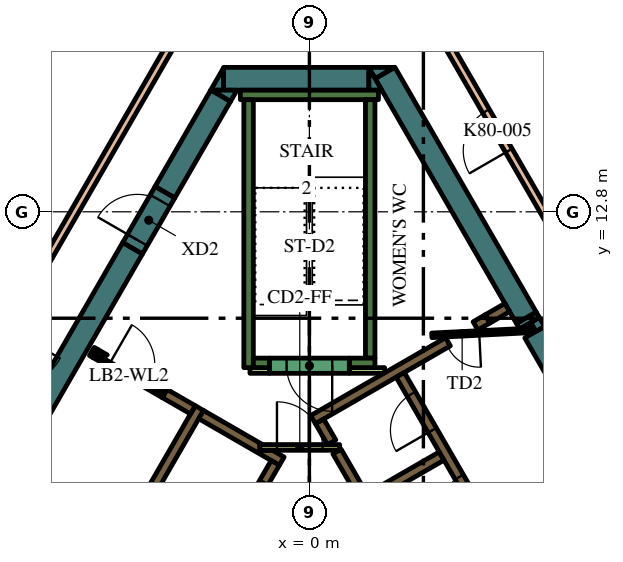
"""IFC4 building model, lengths in metres.
Left out: names, types, materials, properties, quantities, classifications, styles, units other than length and angle.
Written with IfcOpenShell. Run it as: python <this file> out.ifc"""

import sys

from ifc_helpers import new_model, si_unit, direction, frame, frame_2d, origin, origin_2d, place, context, subcontext, project, spatial, polyline, rectangle, outline, extrude, element, fill, save


model = new_model("IFC4")
c1 = context("Model", 3, precision=1e-05, world=origin(), true_north=direction((0.0, 1.0)))
c2 = subcontext(c1, "Body", "Model", "MODEL_VIEW")
j1 = project(units=[si_unit("LENGTHUNIT", "METRE"), si_unit("PLANEANGLEUNIT", "RADIAN")], contexts=[c1])
p1 = place(None, origin())
s1 = spatial("IfcSite", under=j1, at=p1, CompositionType="ELEMENT")
p2 = place(p1, origin())
s2 = spatial("IfcBuilding", under=s1, at=p2, CompositionType="ELEMENT")
p3 = place(p2, frame((0.0, 0.0, 344.4)))
s3 = spatial("IfcBuildingStorey", under=s2, at=p3, CompositionType="ELEMENT", Elevation=344.4)
p4 = place(p3, frame((5.709, 10.012, 0.0), z_axis=(0.0, 0.0, 1.0), x_axis=(0.500399834964, -0.865794435861, 0.0)))
e1 = element("IfcWall", 1, at=p4, inside=s3, PredefinedType="SOLIDWALL", context=c2, shape_type="SweptSolid", body=[
    extrude(rectangle(XDim=0.166, YDim=0.6, at=frame_2d((0.083, 0.0))), origin(), (0.0, 0.0, 1.0), 4.2),
])
p5 = place(p3, frame((5.928, 9.633, 0.0), z_axis=(0.0, 0.0, 1.0), x_axis=(0.499983823482, -0.8660347431, 0.0)))
e2 = element("IfcWall", 2, at=p5, inside=s3, PredefinedType="SOLIDWALL", context=c2, shape_type="SweptSolid", body=[
    extrude(rectangle(XDim=4.528, YDim=0.6, at=frame_2d((2.264, 0.0))), origin(), (0.0, 0.0, 1.0), 4.2),
])
p6 = place(p3, origin())
e3 = element("IfcWall", 3, at=p6, inside=s3, PredefinedType="SOLIDWALL", context=c2, shape_type="SweptSolid", body=[
    extrude(outline(polyline([(6.053, 10.016), (6.187, 9.784), (5.961, 9.654), (5.827, 9.886), (6.053, 10.016)])), origin(), (0.0, 0.0, 1.0), 4.2),
])
p7 = place(p3, frame((1.989, 16.456, 0.0), z_axis=(0.0, 0.0, 1.0), x_axis=(0.499990476767, -0.866030901956, 0.0)))
e4 = element("IfcWall", 4, at=p7, inside=s3, PredefinedType="SOLIDWALL", context=c2, shape_type="SweptSolid", body=[
    extrude(rectangle(XDim=7.438, YDim=0.6, at=frame_2d((3.719, 0.0))), origin(), (0.0, 0.0, 1.0), 4.2),
])
e5 = element("IfcWall", 5, at=p6, inside=s3, PredefinedType="SOLIDWALL", context=c2, shape_type="SweptSolid", body=[
    extrude(outline(polyline([(1.559, 16.6), (2.235, 16.6), (1.728, 16.307), (1.559, 16.6)])), origin(), (0.0, 0.0, 1.0), 4.2),
])
p8 = place(p3, frame((-2.258, 16.3, 0.0), z_axis=(0.0, 0.0, 1.0), x_axis=(1.0, 0.0, 0.0)))
e6 = element("IfcWall", 6, at=p8, inside=s3, PredefinedType="SOLIDWALL", context=c2, shape_type="SweptSolid", body=[
    extrude(rectangle(XDim=3.823, YDim=0.6, at=frame_2d((1.912, 0.0))), origin(), (0.0, 0.0, 1.0), 4.2),
])
e7 = element("IfcWall", 7, at=p6, inside=s3, PredefinedType="SOLIDWALL", context=c2, shape_type="SweptSolid", body=[
    extrude(outline(polyline([(1.905, 16.0), (1.567, 16.0), (1.567, 16.585), (1.905, 16.0)])), origin(), (0.0, 0.0, 1.0), 4.2),
])
e8 = element("IfcWall", 8, at=p6, inside=s3, PredefinedType="SOLIDWALL", context=c2, shape_type="SweptSolid", body=[
    extrude(outline(polyline([(-2.598, 16.0), (-2.26, 16.585), (-2.26, 16.0), (-2.598, 16.0)])), origin(), (0.0, 0.0, 1.0), 4.2),
])
p9 = place(p3, frame((-2.335, 15.855, 0.0), z_axis=(0.0, 0.0, 1.0), x_axis=(-0.499960127962, -0.866048422692, 0.0)))
e9 = element("IfcWall", 9, at=p9, inside=s3, PredefinedType="SOLIDWALL", context=c2, shape_type="SweptSolid", body=[
    extrude(rectangle(XDim=2.934, YDim=0.6, at=frame_2d((1.467, 0.0))), origin(), (0.0, 0.0, 1.0), 4.2),
])
e10 = element("IfcWall", 10, at=p6, inside=s3, PredefinedType="SOLIDWALL", context=c2, shape_type="SweptSolid", body=[
    extrude(outline(polyline([(-1.905, 16.0), (-2.074, 15.707), (-2.581, 16.0), (-1.905, 16.0)])), origin(), (0.0, 0.0, 1.0), 4.2),
])
p10 = place(p3, frame((-4.652, 11.842, 0.0), z_axis=(0.0, 0.0, 1.0), x_axis=(-0.500003640647, -0.866023301845, 0.0)))
e11 = element("IfcWall", 11, at=p10, inside=s3, PredefinedType="SOLIDWALL", context=c2, shape_type="SweptSolid", body=[
    extrude(rectangle(XDim=15.858, YDim=0.6, at=frame_2d((7.929, 0.0))), origin(), (0.0, 0.0, 1.0), 4.2),
])
p11 = place(p3, frame((-1.817, 15.875, 0.0), z_axis=(0.0, 0.0, 1.0), x_axis=(1.0, 0.0, 0.0)))
e12 = element("IfcWall", 12, at=p11, inside=s3, PredefinedType="SOLIDWALL", context=c2, shape_type="SweptSolid", body=[
    extrude(rectangle(XDim=3.634, YDim=0.25, at=frame_2d((1.817, 0.0))), origin(), (0.0, 0.0, 1.0), 4.2),
])
p12 = place(p3, frame((1.6, 8.95, 0.0), z_axis=(0.0, 0.0, 1.0), x_axis=(0.0, 1.0, 0.0)))
e13 = element("IfcWall", 13, at=p12, inside=s3, PredefinedType="SOLIDWALL", context=c2, shape_type="SweptSolid", body=[
    extrude(rectangle(XDim=6.8, YDim=0.25, at=frame_2d((3.4, 0.0))), origin(), (0.0, 0.0, 1.0), 4.2),
])
p13 = place(p3, frame((1.05, 8.825, 0.0), z_axis=(0.0, 0.0, 1.0), x_axis=(1.0, 0.0, 0.0)))
e14 = element("IfcWall", 14, at=p13, inside=s3, PredefinedType="SOLIDWALL", context=c2, shape_type="SweptSolid", body=[
    extrude(rectangle(XDim=0.675, YDim=0.25, at=frame_2d((0.337, 0.0))), origin(), (0.0, 0.0, 1.0), 4.2),
])
p14 = place(p3, frame((-1.6, 8.7, 0.0), z_axis=(0.0, 0.0, 1.0), x_axis=(0.0, 1.0, 0.0)))
e15 = element("IfcWall", 15, at=p14, inside=s3, PredefinedType="SOLIDWALL", context=c2, shape_type="SweptSolid", body=[
    extrude(rectangle(XDim=7.05, YDim=0.25, at=frame_2d((3.525, 0.0))), origin(), (0.0, 0.0, 1.0), 4.2),
])
p15 = place(p3, frame((-1.475, 8.825, 0.0), z_axis=(0.0, 0.0, 1.0), x_axis=(1.0, 0.0, 0.0)))
e16 = element("IfcWall", 16, at=p15, inside=s3, PredefinedType="SOLIDWALL", context=c2, shape_type="SweptSolid", body=[
    extrude(rectangle(XDim=0.425, YDim=0.25, at=frame_2d((0.212, 0.0))), origin(), (0.0, 0.0, 1.0), 4.2),
])
p16 = place(p3, frame((3.647, 9.38, 0.0), z_axis=(0.0, 0.0, 1.0), x_axis=(-0.866027868628, -0.499995730742, 0.0)))
e17 = element("IfcWall", 17, at=p16, inside=s3, PredefinedType="SOLIDWALL", context=c2, shape_type="SweptSolid", body=[
    extrude(rectangle(XDim=4.099, YDim=0.25, at=frame_2d((2.049, 0.0))), origin(), (0.0, 0.0, 1.0), 4.2),
])
p17 = place(p3, frame((0.268, 7.285, 0.0), z_axis=(0.0, 0.0, 1.0), x_axis=(0.500098681536, -0.865968422476, 0.0)))
e18 = element("IfcWall", 18, at=p17, inside=s3, PredefinedType="SOLIDWALL", context=c2, shape_type="SweptSolid", body=[
    extrude(rectangle(XDim=0.636, YDim=0.25, at=frame_2d((0.318, 0.0))), origin(), (0.0, 0.0, 1.0), 4.2),
])
p18 = place(p3, frame((5.97, -2.591, 0.0), z_axis=(0.0, 0.0, 1.0), x_axis=(-0.499994469932, 0.866028596547, 0.0)))
e19 = element("IfcWall", 19, at=p18, inside=s3, PredefinedType="SOLIDWALL", context=c2, shape_type="SweptSolid", body=[
    extrude(rectangle(XDim=10.488, YDim=0.25, at=frame_2d((5.244, 0.0))), origin(), (0.0, 0.0, 1.0), 4.2),
])
p19 = place(p3, frame((1.574, 5.274, 0.0), z_axis=(0.0, 0.0, 1.0), x_axis=(0.866028486751, 0.499994660107, 0.0)))
e20 = element("IfcWall", 20, at=p19, inside=s3, PredefinedType="SOLIDWALL", context=c2, shape_type="SweptSolid", body=[
    extrude(rectangle(XDim=2.2, YDim=0.25, at=frame_2d((1.1, 0.0))), origin(), (0.0, 0.0, 1.0), 4.2),
])
p20 = place(p3, frame((4.688, 9.981, 0.0), z_axis=(0.0, 0.0, 1.0), x_axis=(-0.865974312977, -0.500088481434, 0.0)))
e21 = element("IfcWall", 21, at=p20, inside=s3, PredefinedType="SOLIDWALL", context=c2, shape_type="SweptSolid", body=[
    extrude(rectangle(XDim=0.366, YDim=0.25, at=frame_2d((0.183, 0.0))), origin(), (0.0, 0.0, 1.0), 4.2),
])
p21 = place(p3, frame((4.689, 9.982, 0.0), z_axis=(0.0, 0.0, 1.0), x_axis=(0.865947592822, 0.500134748329, 0.0)))
e22 = element("IfcWall", 22, at=p21, inside=s3, PredefinedType="SOLIDWALL", context=c2, shape_type="SweptSolid", body=[
    extrude(rectangle(XDim=0.598, YDim=0.25, at=frame_2d((0.299, 0.0))), origin(), (0.0, 0.0, 1.0), 4.2),
])
p22 = place(p3, frame((-8.06, -1.311, 0.0), z_axis=(0.0, 0.0, 1.0), x_axis=(0.50000273126, 0.866023826885, 0.0)))
e23 = element("IfcWall", 23, at=p22, inside=s3, PredefinedType="SOLIDWALL", context=c2, shape_type="SweptSolid", body=[
    extrude(rectangle(XDim=10.33, YDim=0.25, at=frame_2d((5.165, 0.0))), origin(), (0.0, 0.0, 1.0), 4.2),
])
e24 = element("IfcWall", 24, at=p6, inside=s3, PredefinedType="SOLIDWALL", context=c2, shape_type="SweptSolid", body=[
    extrude(outline(polyline([(-2.912, 7.356), (-2.787, 7.573), (-1.232, 6.675), (-1.303, 6.675), (-1.304, 6.675), (-1.304, 6.675), (-1.304, 6.525), (-1.304, 6.525), (-1.303, 6.525), (-0.971, 6.525), (-0.665, 6.348), (-0.79, 6.132), (-1.007, 6.257), (-1.007, 6.257), (-2.912, 7.356)])), origin(), (0.0, 0.0, 1.0), 4.2),
])
p23 = place(p3, frame((-5.725, 9.125, 0.0), z_axis=(0.0, 0.0, 1.0), x_axis=(0.866185586049, -0.49972245349, 0.0)))
e25 = element("IfcWall", 25, at=p23, inside=s3, PredefinedType="SOLIDWALL", context=c2, shape_type="SweptSolid", body=[
    extrude(rectangle(XDim=0.11, YDim=0.25, at=frame_2d((0.055, 0.0))), origin(), (0.0, 0.0, 1.0), 4.2),
])
p24 = place(p3, frame((-3.066, 7.59, 0.0), z_axis=(0.0, 0.0, 1.0), x_axis=(-0.866081358704, 0.49990307071, 0.0)))
e26 = element("IfcWall", 26, at=p24, inside=s3, PredefinedType="SOLIDWALL", context=c2, shape_type="SweptSolid", body=[
    extrude(rectangle(XDim=0.858, YDim=0.25, at=frame_2d((0.429, 0.0))), origin(), (0.0, 0.0, 1.0), 4.2),
])
e27 = element("IfcWall", 27, at=p6, inside=s3, PredefinedType="SOLIDWALL", context=c2, shape_type="SweptSolid", body=[
    extrude(outline(polyline([(-3.748, 8.128), (-3.813, 8.015), (-4.027, 8.139), (-4.017, 8.156), (-4.008, 8.173), (-4.0, 8.192), (-3.995, 8.21), (-3.991, 8.23), (-3.99, 8.25), (-3.99, 8.268), (-3.748, 8.128)])), origin(), (0.0, 0.0, 1.0), 4.2),
])
e28 = element("IfcWall", 28, at=p6, inside=s3, PredefinedType="SOLIDWALL", context=c2, shape_type="SweptSolid", body=[
    extrude(outline(polyline([(-5.689, 8.96), (-5.69, 8.961), (-5.565, 9.177), (-5.319, 9.035), (-5.335, 9.026), (-5.351, 9.015), (-5.366, 9.002), (-5.379, 8.988), (-5.392, 8.972), (-5.402, 8.956), (-5.412, 8.939), (-5.629, 9.064), (-5.629, 9.064), (-5.689, 8.96)])), origin(), (0.0, 0.0, 1.0), 4.2),
])
p25 = place(p3, frame((1.05, 8.625, 0.0), z_axis=(0.0, 0.0, 1.0), x_axis=(1.0, 0.0, 0.0)))
e29 = element("IfcWall", 29, at=p25, inside=s3, PredefinedType="PARTITIONING", context=c2, shape_type="SweptSolid", body=[
    extrude(rectangle(XDim=0.929, YDim=0.15, at=frame_2d((0.464, 0.0))), origin(), (0.0, 0.0, 1.0), 3.3),
])
p26 = place(p3, frame((-1.564, 8.625, 0.0), z_axis=(0.0, 0.0, 1.0), x_axis=(1.0, 0.0, 0.0)))
e30 = element("IfcWall", 30, at=p26, inside=s3, PredefinedType="PARTITIONING", context=c2, shape_type="SweptSolid", body=[
    extrude(rectangle(XDim=0.514, YDim=0.15, at=frame_2d((0.257, 0.0))), origin(), (0.0, 0.0, 1.0), 3.3),
])
p27 = place(p3, frame((8.565, -2.185, 0.0), z_axis=(0.0, 0.0, 1.0), x_axis=(-0.499997954832, 0.866026584559, 0.0)))
e31 = element("IfcWall", 31, at=p27, inside=s3, PredefinedType="SOLIDWALL", context=c2, shape_type="SweptSolid", body=[
    extrude(rectangle(XDim=12.35, YDim=0.25, at=frame_2d((6.175, 0.0))), origin(), (0.0, 0.0, 1.0), 4.2),
])
p28 = place(p27, frame((0.685, 0.0, 0.0)))
e32 = element("IfcOpeningElement", 32, at=p28, cuts=e31, PredefinedType="OPENING", context=c2, shape_type="SweptSolid", body=[
    extrude(rectangle(XDim=0.9, YDim=2.1, at=frame_2d((0.45, 1.05))), frame((0.0, 0.135, 0.0), z_axis=(0.0, -1.0, 0.0), x_axis=(1.0, 0.0, 0.0)), (0.0, 0.0, 1.0), 0.27),
])
p29 = place(p27, frame((3.105, 0.0, 0.0)))
e33 = element("IfcOpeningElement", 33, at=p29, cuts=e31, PredefinedType="OPENING", context=c2, shape_type="SweptSolid", body=[
    extrude(rectangle(XDim=1.1, YDim=2.1, at=frame_2d((0.55, 1.05))), frame((0.0, 0.135, 0.0), z_axis=(0.0, -1.0, 0.0), x_axis=(1.0, 0.0, 0.0)), (0.0, 0.0, 1.0), 0.27),
])
p30 = place(p27, frame((5.625, 0.0, 0.0)))
e34 = element("IfcOpeningElement", 34, at=p30, cuts=e31, PredefinedType="OPENING", context=c2, shape_type="SweptSolid", body=[
    extrude(rectangle(XDim=1.1, YDim=2.1, at=frame_2d((0.55, 1.05))), frame((0.0, 0.135, 0.0), z_axis=(0.0, -1.0, 0.0), x_axis=(1.0, 0.0, 0.0)), (0.0, 0.0, 1.0), 0.27),
])
p31 = place(p27, frame((8.145, 0.0, 0.0)))
e35 = element("IfcOpeningElement", 35, at=p31, cuts=e31, PredefinedType="OPENING", context=c2, shape_type="SweptSolid", body=[
    extrude(rectangle(XDim=1.1, YDim=2.1, at=frame_2d((0.55, 1.05))), frame((0.0, 0.135, 0.0), z_axis=(0.0, -1.0, 0.0), x_axis=(1.0, 0.0, 0.0)), (0.0, 0.0, 1.0), 0.27),
])
p32 = place(p27, frame((10.665, 0.0, 0.0)))
e36 = element("IfcOpeningElement", 36, at=p32, cuts=e31, PredefinedType="OPENING", context=c2, shape_type="SweptSolid", body=[
    extrude(rectangle(XDim=1.1, YDim=2.1, at=frame_2d((0.55, 1.05))), frame((0.0, 0.135, 0.0), z_axis=(0.0, -1.0, 0.0), x_axis=(1.0, 0.0, 0.0)), (0.0, 0.0, 1.0), 0.27),
])
p33 = place(p3, frame((-0.898, 6.194, 0.0), z_axis=(0.0, 0.0, 1.0), x_axis=(-0.499996202215, -0.866027596426, 0.0)))
e37 = element("IfcWall", 37, at=p33, inside=s3, PredefinedType="SOLIDWALL", context=c2, shape_type="SweptSolid", body=[
    extrude(rectangle(XDim=9.83, YDim=0.25, at=frame_2d((4.915, 0.0))), origin(), (0.0, 0.0, 1.0), 4.2),
])
p34 = place(p33, frame((0.585, 0.0, 0.0)))
e38 = element("IfcOpeningElement", 38, at=p34, cuts=e37, PredefinedType="OPENING", context=c2, shape_type="SweptSolid", body=[
    extrude(rectangle(XDim=1.1, YDim=2.1, at=frame_2d((0.55, 1.05))), frame((0.0, 0.135, 0.0), z_axis=(0.0, -1.0, 0.0), x_axis=(1.0, 0.0, 0.0)), (0.0, 0.0, 1.0), 0.27),
])
p35 = place(p33, frame((3.105, 0.0, 0.0)))
e39 = element("IfcOpeningElement", 39, at=p35, cuts=e37, PredefinedType="OPENING", context=c2, shape_type="SweptSolid", body=[
    extrude(rectangle(XDim=1.1, YDim=2.1, at=frame_2d((0.55, 1.05))), frame((0.0, 0.135, 0.0), z_axis=(0.0, -1.0, 0.0), x_axis=(1.0, 0.0, 0.0)), (0.0, 0.0, 1.0), 0.27),
])
p36 = place(p33, frame((5.625, 0.0, 0.0)))
e40 = element("IfcOpeningElement", 40, at=p36, cuts=e37, PredefinedType="OPENING", context=c2, shape_type="SweptSolid", body=[
    extrude(rectangle(XDim=1.1, YDim=2.1, at=frame_2d((0.55, 1.05))), frame((0.0, 0.135, 0.0), z_axis=(0.0, -1.0, 0.0), x_axis=(1.0, 0.0, 0.0)), (0.0, 0.0, 1.0), 0.27),
])
p37 = place(p33, frame((8.145, 0.0, 0.0)))
e41 = element("IfcOpeningElement", 41, at=p37, cuts=e37, PredefinedType="OPENING", context=c2, shape_type="SweptSolid", body=[
    extrude(rectangle(XDim=1.1, YDim=2.1, at=frame_2d((0.55, 1.05))), frame((0.0, 0.135, 0.0), z_axis=(0.0, -1.0, 0.0), x_axis=(1.0, 0.0, 0.0)), (0.0, 0.0, 1.0), 0.27),
])
p38 = place(p3, frame((1.05, 8.75, 0.0), z_axis=(0.0, 0.0, 1.0), x_axis=(-1.0, 0.0, 0.0)))
e42 = element("IfcWall", 42, at=p38, inside=s3, PredefinedType="SOLIDWALL", context=c2, shape_type="SweptSolid", body=[
    extrude(rectangle(XDim=2.1, YDim=0.4, at=frame_2d((1.05, 0.0))), origin(), (0.0, 0.0, 1.0), 4.2),
])
p39 = place(p38, frame((0.45, 0.0, 0.0)))
e43 = element("IfcOpeningElement", 43, at=p39, cuts=e42, PredefinedType="OPENING", context=c2, shape_type="SweptSolid", body=[
    extrude(rectangle(XDim=1.2, YDim=2.1, at=frame_2d((0.6, 1.05))), frame((0.0, 0.21, 0.0), z_axis=(0.0, -1.0, 0.0), x_axis=(1.0, 0.0, 0.0)), (0.0, 0.0, 1.0), 0.42),
])
p40 = place(p3, frame((5.917, 9.684, 0.0), z_axis=(0.0, 0.0, 1.0), x_axis=(-0.998758194515, -0.049820366212, 0.0)))
e44 = element("IfcWall", 44, at=p40, inside=s3, PredefinedType="PARTITIONING", context=c2, shape_type="SweptSolid", body=[
    extrude(rectangle(XDim=2.7, YDim=0.12, at=frame_2d((1.35, 0.0))), origin(), (0.0, 0.0, 1.0), 3.3),
])
p41 = place(p40, frame((1.45, 0.0, 0.0)))
e45 = element("IfcOpeningElement", 45, at=p41, cuts=e44, PredefinedType="OPENING", context=c2, shape_type="SweptSolid", body=[
    extrude(rectangle(XDim=0.9, YDim=2.1, at=frame_2d((0.45, 1.05))), frame((0.0, 0.07, 0.0), z_axis=(0.0, -1.0, 0.0), x_axis=(1.0, 0.0, 0.0)), (0.0, 0.0, 1.0), 0.14),
])
p42 = place(p3, frame((-1.303, 6.6, 0.0), z_axis=(0.0, 0.0, 1.0), x_axis=(1.0, 0.0, 0.0)))
e46 = element("IfcWall", 46, at=p42, inside=s3, PredefinedType="PARTITIONING", context=c2, shape_type="SweptSolid", body=[
    extrude(rectangle(XDim=2.1, YDim=0.15, at=frame_2d((1.05, 0.0))), origin(), (0.0, 0.0, 1.0), 4.2),
])
p43 = place(p42, frame((0.45, 0.0, 0.0)))
e47 = element("IfcOpeningElement", 47, at=p43, cuts=e46, PredefinedType="OPENING", context=c2, shape_type="SweptSolid", body=[
    extrude(rectangle(XDim=1.2, YDim=2.1, at=frame_2d((0.6, 1.05))), frame((0.0, 0.085, 0.0), z_axis=(0.0, -1.0, 0.0), x_axis=(1.0, 0.0, 0.0)), (0.0, 0.0, 1.0), 0.17),
])
p44 = place(p3, frame((-5.659, 9.012, 0.0), z_axis=(0.0, 0.0, 1.0), x_axis=(0.866009402589, -0.500027713859, 0.0)))
e48 = element("IfcWall", 48, at=p44, inside=s3, PredefinedType="PARTITIONING", context=c2, shape_type="SweptSolid", body=[
    extrude(rectangle(XDim=2.1, YDim=0.12, at=frame_2d((1.05, 0.0))), origin(), (0.0, 0.0, 1.0), 3.3),
])
p45 = place(p44, frame((0.45, 0.0, 0.0)))
e49 = element("IfcOpeningElement", 49, at=p45, cuts=e48, PredefinedType="OPENING", context=c2, shape_type="SweptSolid", body=[
    extrude(rectangle(XDim=1.2, YDim=2.1, at=frame_2d((0.6, 1.05))), frame((0.0, 0.07, 0.0), z_axis=(0.0, -1.0, 0.0), x_axis=(1.0, 0.0, 0.0)), (0.0, 0.0, 1.0), 0.14),
])
p46 = place(p3, frame((-4.652, 11.842, 0.0), z_axis=(0.0, 0.0, 1.0), x_axis=(0.500062241894, 0.865989465428, 0.0)))
e50 = element("IfcWall", 50, at=p46, inside=s3, PredefinedType="SOLIDWALL", context=c2, shape_type="SweptSolid", body=[
    extrude(rectangle(XDim=1.7, YDim=0.6, at=frame_2d((0.85, 0.0))), origin(), (0.0, 0.0, 1.0), 4.2),
])
p47 = place(p46, frame((0.25, 0.0, 0.0)))
e51 = element("IfcOpeningElement", 51, at=p47, cuts=e50, PredefinedType="OPENING", context=c2, shape_type="SweptSolid", body=[
    extrude(rectangle(XDim=1.2, YDim=2.1, at=frame_2d((0.6, 1.05))), frame((0.0, 0.31, 0.0), z_axis=(0.0, -1.0, 0.0), x_axis=(1.0, 0.0, 0.0)), (0.0, 0.0, 1.0), 0.62),
])
p48 = place(p3, frame((-3.118, 18.1, 0.0), z_axis=(0.0, 0.0, 1.0), x_axis=(-0.499998496574, -0.866026271786, 0.0)))
e52 = element("IfcWall", 52, at=p48, inside=s3, PredefinedType="PARTITIONING", context=c2, shape_type="SweptSolid", body=[
    extrude(rectangle(XDim=20.9, YDim=0.2, at=frame_2d((10.45, 0.0))), origin(), (0.0, 0.0, 1.0), 3.3),
])
p49 = place(p48, frame((9.65, 0.0, 0.0)))
e53 = element("IfcOpeningElement", 53, at=p49, cuts=e52, PredefinedType="OPENING", context=c2, shape_type="SweptSolid", body=[
    extrude(rectangle(XDim=1.6, YDim=2.1, at=frame_2d((0.8, 1.05))), frame((0.0, 0.11, 0.0), z_axis=(0.0, -1.0, 0.0), x_axis=(1.0, 0.0, 0.0)), (0.0, 0.0, 1.0), 0.22),
])
p50 = place(p3, frame((6.779, 11.759, 0.0), z_axis=(0.0, 0.0, 1.0), x_axis=(-0.50000817069, 0.866020686383, 0.0)))
e54 = element("IfcWall", 54, at=p50, inside=s3, PredefinedType="PARTITIONING", context=c2, shape_type="SweptSolid", body=[
    extrude(rectangle(XDim=7.323, YDim=0.2, at=frame_2d((3.661, 0.0))), origin(), (0.0, 0.0, 1.0), 3.3),
])
p51 = place(p50, frame((3.061, 0.0, 0.0)))
e55 = element("IfcOpeningElement", 55, at=p51, cuts=e54, PredefinedType="OPENING", context=c2, shape_type="SweptSolid", body=[
    extrude(rectangle(XDim=1.2, YDim=2.1, at=frame_2d((0.6, 1.05))), frame((0.0, 0.11, 0.0), z_axis=(0.0, -1.0, 0.0), x_axis=(1.0, 0.0, 0.0)), (0.0, 0.0, 1.0), 0.22),
])
p52 = place(p3, frame((-6.808, 17.908, 0.0), z_axis=(0.0, 0.0, 1.0), x_axis=(-0.499977492351, -0.866038398192, 0.0)))
e56 = element("IfcWall", 56, at=p52, inside=s3, PredefinedType="SOLIDWALL", context=c2, shape_type="SweptSolid", body=[
    extrude(rectangle(XDim=1.464, YDim=0.3, at=frame_2d((0.732, 0.0))), origin(), (0.0, 0.0, 1.0), 3.8),
])
p53 = place(p31, origin())
e57 = element("IfcDoor", 57, at=p53, inside=s3, OperationType="DOUBLE_DOOR_SLIDING", PredefinedType="DOOR", context=c2, shape_type="SweptSolid", body=[
    extrude(rectangle(XDim=1.1, YDim=2.1, at=frame_2d((0.55, 1.05))), frame((0.0, 0.025, 0.0), z_axis=(0.0, -1.0, 0.0), x_axis=(1.0, 0.0, 0.0)), (0.0, 0.0, 1.0), 0.05),
])
fill(e35, e57)
p54 = place(p32, origin())
e58 = element("IfcDoor", 58, at=p54, inside=s3, OperationType="DOUBLE_DOOR_SLIDING", PredefinedType="DOOR", context=c2, shape_type="SweptSolid", body=[
    extrude(rectangle(XDim=1.1, YDim=2.1, at=frame_2d((0.55, 1.05))), frame((0.0, 0.025, 0.0), z_axis=(0.0, -1.0, 0.0), x_axis=(1.0, 0.0, 0.0)), (0.0, 0.0, 1.0), 0.05),
])
fill(e36, e58)
p55 = place(p34, origin())
e59 = element("IfcDoor", 59, at=p55, inside=s3, OperationType="DOUBLE_DOOR_SLIDING", PredefinedType="DOOR", context=c2, shape_type="SweptSolid", body=[
    extrude(rectangle(XDim=1.1, YDim=2.1, at=frame_2d((0.55, 1.05))), frame((0.0, 0.025, 0.0), z_axis=(0.0, -1.0, 0.0), x_axis=(1.0, 0.0, 0.0)), (0.0, 0.0, 1.0), 0.05),
])
fill(e38, e59)
p56 = place(p39, origin())
e60 = element("IfcDoor", 60, at=p56, inside=s3, OperationType="SINGLE_SWING_LEFT", PredefinedType="DOOR", context=c2, shape_type="SweptSolid", body=[
    extrude(rectangle(XDim=1.2, YDim=2.1, at=frame_2d((0.6, 1.05))), frame((0.0, 0.025, 0.0), z_axis=(0.0, -1.0, 0.0), x_axis=(1.0, 0.0, 0.0)), (0.0, 0.0, 1.0), 0.05),
])
fill(e43, e60)
p57 = place(p41, origin())
e61 = element("IfcDoor", 61, at=p57, inside=s3, OperationType="SINGLE_SWING_LEFT", PredefinedType="DOOR", context=c2, shape_type="SweptSolid", body=[
    extrude(rectangle(XDim=0.9, YDim=2.1, at=frame_2d((0.45, 1.05))), frame((0.0, 0.025, 0.0), z_axis=(0.0, -1.0, 0.0), x_axis=(1.0, 0.0, 0.0)), (0.0, 0.0, 1.0), 0.05),
])
fill(e45, e61)
p58 = place(p43, origin())
e62 = element("IfcDoor", 62, at=p58, inside=s3, OperationType="SINGLE_SWING_LEFT", PredefinedType="DOOR", context=c2, shape_type="SweptSolid", body=[
    extrude(rectangle(XDim=1.2, YDim=2.1, at=frame_2d((0.6, 1.05))), frame((0.0, 0.025, 0.0), z_axis=(0.0, -1.0, 0.0), x_axis=(1.0, 0.0, 0.0)), (0.0, 0.0, 1.0), 0.05),
])
fill(e47, e62)
p59 = place(p45, origin())
e63 = element("IfcDoor", 63, at=p59, inside=s3, OperationType="SINGLE_SWING_LEFT", PredefinedType="DOOR", context=c2, shape_type="SweptSolid", body=[
    extrude(rectangle(XDim=1.2, YDim=2.1, at=frame_2d((0.6, 1.05))), frame((0.0, 0.025, 0.0), z_axis=(0.0, -1.0, 0.0), x_axis=(1.0, 0.0, 0.0)), (0.0, 0.0, 1.0), 0.05),
])
fill(e49, e63)
p60 = place(p47, origin())
e64 = element("IfcDoor", 64, at=p60, inside=s3, OperationType="SINGLE_SWING_LEFT", PredefinedType="DOOR", context=c2, shape_type="SweptSolid", body=[
    extrude(rectangle(XDim=1.2, YDim=2.1, at=frame_2d((0.6, 1.05))), frame((0.0, 0.025, 0.0), z_axis=(0.0, -1.0, 0.0), x_axis=(1.0, 0.0, 0.0)), (0.0, 0.0, 1.0), 0.05),
])
fill(e51, e64)
p61 = place(p51, origin())
e65 = element("IfcDoor", 65, at=p61, inside=s3, OperationType="SINGLE_SWING_RIGHT", PredefinedType="DOOR", context=c2, shape_type="SweptSolid", body=[
    extrude(rectangle(XDim=1.2, YDim=2.1, at=frame_2d((0.6, 1.05))), frame((0.0, 0.025, 0.0), z_axis=(0.0, -1.0, 0.0), x_axis=(1.0, 0.0, 0.0)), (0.0, 0.0, 1.0), 0.05),
])
fill(e55, e65)
p62 = place(p2, frame((0.0, 0.0, 348.6)))
p63 = place(p62, origin())
p64 = place(p63, frame((0.0, 12.35, 0.0)))
p65 = place(p64, frame((0.0, 0.0, 1.15)))
e66 = element("IfcWindow", 66, at=p65, inside=s3, PartitioningType="SINGLE_PANEL", PredefinedType="WINDOW", context=c2, shape_type="SweptSolid", body=[
    extrude(rectangle(XDim=2.95, YDim=6.8, at=origin_2d()), origin(), (0.0, 0.0, 1.0), 0.05),
])
save(model, sys.argv[1])
